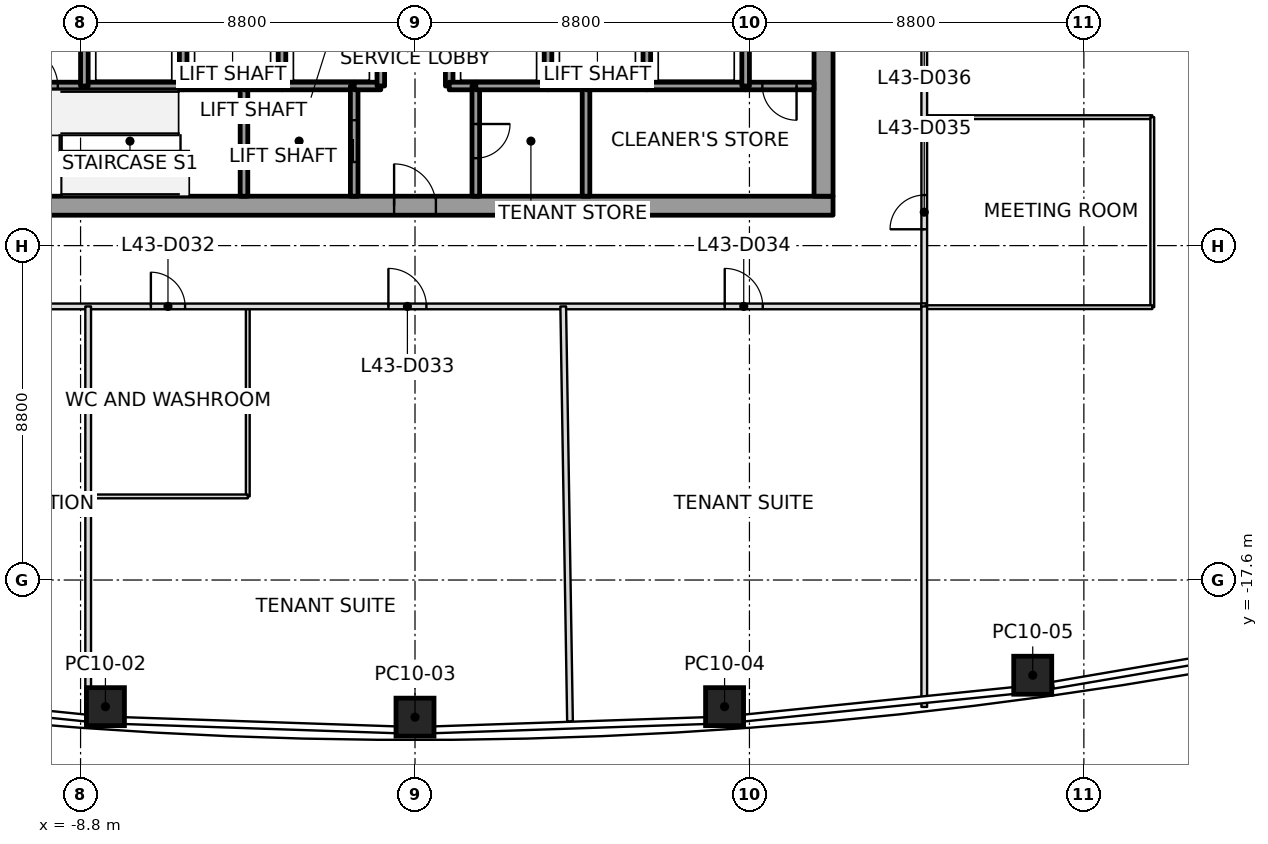
"""IFC4 building model, lengths in metres.
Left out: names, types, materials, properties, quantities, classifications, styles, units other than length and angle.
Written with IfcOpenShell. Run it as: python <this file> out.ifc"""

import sys

from ifc_helpers import new_model, si_unit, direction, frame, frame_2d, origin, origin_2d, place, context, subcontext, project, spatial, rectangle, extrude, element, fill, save


model = new_model("IFC4")
c1 = context("Model", 3, precision=1e-05, world=origin(), true_north=direction((0.0, 1.0)))
c2 = subcontext(c1, "Body", "Model", "MODEL_VIEW")
j1 = project(units=[si_unit("LENGTHUNIT", "METRE"), si_unit("PLANEANGLEUNIT", "RADIAN")], contexts=[c1])
p1 = place(None, origin())
s1 = spatial("IfcSite", under=j1, at=p1, CompositionType="ELEMENT")
p2 = place(p1, origin())
s2 = spatial("IfcBuilding", under=s1, at=p2, CompositionType="ELEMENT")
p3 = place(p2, frame((0.0, 0.0, 193.8)))
s3 = spatial("IfcBuildingStorey", under=s2, at=p3, CompositionType="ELEMENT", Elevation=193.8)
p4 = place(p3, frame((-8.146, -20.933, 0.0), z_axis=(0.008849193104, 0.011229320904, 0.999897791843), x_axis=(-0.997666886655, 0.067791509267, 0.008068118949)))
e1 = element("IfcColumn", 1, at=p4, inside=s3, PredefinedType="COLUMN", context=c2, shape_type="SweptSolid", body=[
    extrude(rectangle(XDim=1.0, YDim=1.0, at=origin_2d()), origin(), (0.0, 0.0, 1.0), 4.0),
])
p5 = place(p3, frame((0.0, -21.208, 0.0), z_axis=(0.0, 0.01141283087, 0.999934871525), x_axis=(1.0, 0.0, 0.0)))
e2 = element("IfcColumn", 2, at=p5, inside=s3, PredefinedType="COLUMN", context=c2, shape_type="SweptSolid", body=[
    extrude(rectangle(XDim=1.0, YDim=1.0, at=origin_2d()), origin(), (0.0, 0.0, 1.0), 4.0),
])
p6 = place(p3, frame((8.146, -20.933, 0.0), z_axis=(-0.008849193104, 0.011229320904, 0.999897791843), x_axis=(0.997666886655, 0.067791509267, 0.008068118949)))
e3 = element("IfcColumn", 3, at=p6, inside=s3, PredefinedType="COLUMN", context=c2, shape_type="SweptSolid", body=[
    extrude(rectangle(XDim=1.0, YDim=1.0, at=origin_2d()), origin(), (0.0, 0.0, 1.0), 4.0),
])
p7 = place(p3, frame((16.254, -20.106, 0.0), z_axis=(-0.017574453011, 0.010434831475, 0.999791104628), x_axis=(0.99068130509, 0.135257041378, 0.01600264049)))
e4 = element("IfcColumn", 4, at=p7, inside=s3, PredefinedType="COLUMN", context=c2, shape_type="SweptSolid", body=[
    extrude(rectangle(XDim=1.0, YDim=1.0, at=origin_2d()), origin(), (0.0, 0.0, 1.0), 4.001),
])
p8 = place(p3, frame((-11.0, -7.75, 0.0), z_axis=(0.0, 0.0, 1.0), x_axis=(1.0, 0.0, 0.0)))
e5 = element("IfcWall", 5, at=p8, inside=s3, PredefinedType="SHEAR", context=c2, shape_type="SweptSolid", body=[
    extrude(rectangle(XDim=22.0, YDim=0.5, at=frame_2d((11.0, 0.0))), origin(), (0.0, 0.0, 1.0), 4.0),
])
p9 = place(p8, frame((10.45, 0.0, 0.0)))
e6 = element("IfcOpeningElement", 6, at=p9, cuts=e5, PredefinedType="OPENING", context=c2, shape_type="SweptSolid", body=[
    extrude(rectangle(XDim=1.1, YDim=2.1, at=frame_2d((0.55, 1.05))), frame((0.0, 0.25, 0.0), z_axis=(0.0, -1.0, 0.0), x_axis=(1.0, 0.0, 0.0)), (0.0, 0.0, 1.0), 0.5),
])
p10 = place(p3, frame((10.75, -7.5, 0.0), z_axis=(0.0, 0.0, 1.0), x_axis=(0.0, 1.0, 0.0)))
e7 = element("IfcWall", 7, at=p10, inside=s3, PredefinedType="SHEAR", context=c2, shape_type="SweptSolid", body=[
    extrude(rectangle(XDim=15.0, YDim=0.5, at=frame_2d((7.5, 0.0))), origin(), (0.0, 0.0, 1.0), 4.0),
])
p11 = place(p10, frame((6.6, 0.0, 0.0)))
e8 = element("IfcOpeningElement", 8, at=p11, cuts=e7, PredefinedType="OPENING", context=c2, shape_type="SweptSolid", body=[
    extrude(rectangle(XDim=1.8, YDim=2.1, at=frame_2d((0.9, 1.05))), frame((0.0, 0.25, 0.0), z_axis=(0.0, -1.0, 0.0), x_axis=(1.0, 0.0, 0.0)), (0.0, 0.0, 1.0), 0.5),
])
p12 = place(p3, frame((-10.5, -4.6, 0.0), z_axis=(0.0, 0.0, 1.0), x_axis=(1.0, 0.0, 0.0)))
e9 = element("IfcWall", 9, at=p12, inside=s3, PredefinedType="SOLIDWALL", context=c2, shape_type="SweptSolid", body=[
    extrude(rectangle(XDim=1.8, YDim=0.2, at=frame_2d((0.9, 0.0))), origin(), (0.0, 0.0, 1.0), 3.85),
])
p13 = place(p12, frame((0.1, 0.0, 0.0)))
e10 = element("IfcOpeningElement", 10, at=p13, cuts=e9, PredefinedType="OPENING", context=c2, shape_type="SweptSolid", body=[
    extrude(rectangle(XDim=1.0, YDim=2.1, at=frame_2d((0.5, 1.05))), frame((0.0, 0.1, 0.0), z_axis=(0.0, -1.0, 0.0), x_axis=(1.0, 0.0, 0.0)), (0.0, 0.0, 1.0), 0.2),
])
p14 = place(p3, frame((-8.7, -4.6, 0.0), z_axis=(0.0, 0.0, 1.0), x_axis=(1.0, 0.0, 0.0)))
e11 = element("IfcWall", 11, at=p14, inside=s3, PredefinedType="SOLIDWALL", context=c2, shape_type="SweptSolid", body=[
    extrude(rectangle(XDim=2.6, YDim=0.2, at=frame_2d((1.3, 0.0))), origin(), (0.0, 0.0, 1.0), 3.85),
])
p15 = place(p3, frame((-8.7, -4.6, 0.0), z_axis=(0.0, 0.0, 1.0), x_axis=(0.0, 1.0, 0.0)))
e12 = element("IfcWall", 12, at=p15, inside=s3, PredefinedType="SOLIDWALL", context=c2, shape_type="SweptSolid", body=[
    extrude(rectangle(XDim=2.8, YDim=0.2, at=frame_2d((1.4, 0.0))), origin(), (0.0, 0.0, 1.0), 3.85),
])
p16 = place(p3, frame((-6.1, -4.6, 0.0), z_axis=(0.0, 0.0, 1.0), x_axis=(1.0, 0.0, 0.0)))
e13 = element("IfcWall", 13, at=p16, inside=s3, PredefinedType="SOLIDWALL", context=c2, shape_type="SweptSolid", body=[
    extrude(rectangle(XDim=1.6, YDim=0.2, at=frame_2d((0.8, 0.0))), origin(), (0.0, 0.0, 1.0), 3.85),
])
p17 = place(p3, frame((-6.1, -4.6, 0.0), z_axis=(0.0, 0.0, 1.0), x_axis=(0.0, 1.0, 0.0)))
e14 = element("IfcWall", 14, at=p17, inside=s3, PredefinedType="SOLIDWALL", context=c2, shape_type="SweptSolid", body=[
    extrude(rectangle(XDim=2.8, YDim=0.2, at=frame_2d((1.4, 0.0))), origin(), (0.0, 0.0, 1.0), 3.85),
])
p18 = place(p3, frame((-4.5, -4.6, 0.0), z_axis=(0.0, 0.0, 1.0), x_axis=(0.0, -1.0, 0.0)))
e15 = element("IfcWall", 15, at=p18, inside=s3, PredefinedType="SOLIDWALL", context=c2, shape_type="SweptSolid", body=[
    extrude(rectangle(XDim=2.9, YDim=0.2, at=frame_2d((1.45, 0.0))), origin(), (0.0, 0.0, 1.0), 3.85),
])
p19 = place(p3, frame((-4.5, -4.6, 0.0), z_axis=(0.0, 0.0, 1.0), x_axis=(1.0, 0.0, 0.0)))
e16 = element("IfcWall", 16, at=p19, inside=s3, PredefinedType="SOLIDWALL", context=c2, shape_type="SweptSolid", body=[
    extrude(rectangle(XDim=1.0, YDim=0.2, at=frame_2d((0.5, 0.0))), origin(), (0.0, 0.0, 1.0), 3.85),
])
p20 = place(p3, frame((-3.5, -4.6, 0.0), z_axis=(0.0, 0.0, 1.0), x_axis=(1.0, 0.0, 0.0)))
e17 = element("IfcWall", 17, at=p20, inside=s3, PredefinedType="SOLIDWALL", context=c2, shape_type="SweptSolid", body=[
    extrude(rectangle(XDim=1.9, YDim=0.2, at=frame_2d((0.95, 0.0))), origin(), (0.0, 0.0, 1.0), 3.85),
])
p21 = place(p3, frame((-3.5, -4.6, 0.0), z_axis=(0.0, 0.0, 1.0), x_axis=(0.0, 1.0, 0.0)))
e18 = element("IfcWall", 18, at=p21, inside=s3, PredefinedType="SOLIDWALL", context=c2, shape_type="SweptSolid", body=[
    extrude(rectangle(XDim=2.8, YDim=0.2, at=frame_2d((1.4, 0.0))), origin(), (0.0, 0.0, 1.0), 3.85),
])
p22 = place(p3, frame((-1.6, -7.5, 0.0), z_axis=(0.0, 0.0, 1.0), x_axis=(0.0, 1.0, 0.0)))
e19 = element("IfcWall", 19, at=p22, inside=s3, PredefinedType="SOLIDWALL", context=c2, shape_type="SweptSolid", body=[
    extrude(rectangle(XDim=2.9, YDim=0.2, at=frame_2d((1.45, 0.0))), origin(), (0.0, 0.0, 1.0), 3.85),
])
p23 = place(p22, frame((0.9, 0.0, 0.0)))
e20 = element("IfcOpeningElement", 20, at=p23, cuts=e19, PredefinedType="OPENING", context=c2, shape_type="SweptSolid", body=[
    extrude(rectangle(XDim=1.1, YDim=2.1, at=frame_2d((0.55, 1.05))), frame((0.0, 0.1, 0.0), z_axis=(0.0, -1.0, 0.0), x_axis=(1.0, 0.0, 0.0)), (0.0, 0.0, 1.0), 0.2),
])
p24 = place(p3, frame((-1.6, -4.6, 0.0), z_axis=(0.0, 0.0, 1.0), x_axis=(1.0, 0.0, 0.0)))
e21 = element("IfcWall", 21, at=p24, inside=s3, PredefinedType="SOLIDWALL", context=c2, shape_type="SweptSolid", body=[
    extrude(rectangle(XDim=0.7, YDim=0.2, at=frame_2d((0.35, 0.0))), origin(), (0.0, 0.0, 1.0), 3.85),
])
for number, where, z_axis, x_axis in (
    (22, (-0.9, -4.6, 0.0), (0.0, 0.0, 1.0), (0.0, 1.0, 0.0)),
    (23, (0.9, -1.8, 0.0), (0.0, 0.0, 1.0), (0.0, -1.0, 0.0)),
):
    element("IfcWall", number, at=place(p3, frame(where, z_axis=z_axis, x_axis=x_axis)), inside=s3, PredefinedType="SOLIDWALL", context=c2, shape_type="SweptSolid", body=[
        extrude(rectangle(XDim=2.8, YDim=0.2, at=frame_2d((1.4, 0.0))), origin(), (0.0, 0.0, 1.0), 3.85),
    ])
p25 = place(p3, frame((0.9, -4.6, 0.0), z_axis=(0.0, 0.0, 1.0), x_axis=(1.0, 0.0, 0.0)))
e24 = element("IfcWall", 24, at=p25, inside=s3, PredefinedType="SOLIDWALL", context=c2, shape_type="SweptSolid", body=[
    extrude(rectangle(XDim=0.7, YDim=0.2, at=frame_2d((0.35, 0.0))), origin(), (0.0, 0.0, 1.0), 3.85),
])
p26 = place(p3, frame((1.6, -4.6, 0.0), z_axis=(0.0, 0.0, 1.0), x_axis=(0.0, -1.0, 0.0)))
e25 = element("IfcWall", 25, at=p26, inside=s3, PredefinedType="SOLIDWALL", context=c2, shape_type="SweptSolid", body=[
    extrude(rectangle(XDim=2.9, YDim=0.2, at=frame_2d((1.45, 0.0))), origin(), (0.0, 0.0, 1.0), 3.85),
])
p27 = place(p26, frame((1.0, 0.0, 0.0)))
e26 = element("IfcOpeningElement", 26, at=p27, cuts=e25, PredefinedType="OPENING", context=c2, shape_type="SweptSolid", body=[
    extrude(rectangle(XDim=0.9, YDim=2.1, at=frame_2d((0.45, 1.05))), frame((0.0, 0.1, 0.0), z_axis=(0.0, -1.0, 0.0), x_axis=(1.0, 0.0, 0.0)), (0.0, 0.0, 1.0), 0.2),
])
p28 = place(p3, frame((3.5, -4.6, 0.0), z_axis=(0.0, 0.0, 1.0), x_axis=(-1.0, 0.0, 0.0)))
e27 = element("IfcWall", 27, at=p28, inside=s3, PredefinedType="SOLIDWALL", context=c2, shape_type="SweptSolid", body=[
    extrude(rectangle(XDim=1.9, YDim=0.2, at=frame_2d((0.95, 0.0))), origin(), (0.0, 0.0, 1.0), 3.85),
])
p29 = place(p3, frame((4.5, -4.6, 0.0), z_axis=(0.0, 0.0, 1.0), x_axis=(-1.0, 0.0, 0.0)))
e28 = element("IfcWall", 28, at=p29, inside=s3, PredefinedType="SOLIDWALL", context=c2, shape_type="SweptSolid", body=[
    extrude(rectangle(XDim=1.0, YDim=0.2, at=frame_2d((0.5, 0.0))), origin(), (0.0, 0.0, 1.0), 3.85),
])
p30 = place(p3, frame((3.5, -4.6, 0.0), z_axis=(0.0, 0.0, 1.0), x_axis=(0.0, 1.0, 0.0)))
e29 = element("IfcWall", 29, at=p30, inside=s3, PredefinedType="SOLIDWALL", context=c2, shape_type="SweptSolid", body=[
    extrude(rectangle(XDim=2.8, YDim=0.2, at=frame_2d((1.4, 0.0))), origin(), (0.0, 0.0, 1.0), 3.85),
])
p31 = place(p3, frame((4.5, -4.6, 0.0), z_axis=(0.0, 0.0, 1.0), x_axis=(0.0, -1.0, 0.0)))
e30 = element("IfcWall", 30, at=p31, inside=s3, PredefinedType="SOLIDWALL", context=c2, shape_type="SweptSolid", body=[
    extrude(rectangle(XDim=2.9, YDim=0.2, at=frame_2d((1.45, 0.0))), origin(), (0.0, 0.0, 1.0), 3.85),
])
p32 = place(p3, frame((6.1, -4.6, 0.0), z_axis=(0.0, 0.0, 1.0), x_axis=(-1.0, 0.0, 0.0)))
e31 = element("IfcWall", 31, at=p32, inside=s3, PredefinedType="SOLIDWALL", context=c2, shape_type="SweptSolid", body=[
    extrude(rectangle(XDim=1.6, YDim=0.2, at=frame_2d((0.8, 0.0))), origin(), (0.0, 0.0, 1.0), 3.85),
])
p33 = place(p3, frame((8.7, -4.6, 0.0), z_axis=(0.0, 0.0, 1.0), x_axis=(-1.0, 0.0, 0.0)))
e32 = element("IfcWall", 32, at=p33, inside=s3, PredefinedType="SOLIDWALL", context=c2, shape_type="SweptSolid", body=[
    extrude(rectangle(XDim=2.6, YDim=0.2, at=frame_2d((1.3, 0.0))), origin(), (0.0, 0.0, 1.0), 3.85),
])
p34 = place(p3, frame((6.1, -4.6, 0.0), z_axis=(0.0, 0.0, 1.0), x_axis=(0.0, 1.0, 0.0)))
e33 = element("IfcWall", 33, at=p34, inside=s3, PredefinedType="SOLIDWALL", context=c2, shape_type="SweptSolid", body=[
    extrude(rectangle(XDim=2.8, YDim=0.2, at=frame_2d((1.4, 0.0))), origin(), (0.0, 0.0, 1.0), 3.85),
])
p35 = place(p3, frame((10.5, -4.6, 0.0), z_axis=(0.0, 0.0, 1.0), x_axis=(-1.0, 0.0, 0.0)))
e34 = element("IfcWall", 34, at=p35, inside=s3, PredefinedType="SOLIDWALL", context=c2, shape_type="SweptSolid", body=[
    extrude(rectangle(XDim=1.8, YDim=0.2, at=frame_2d((0.9, 0.0))), origin(), (0.0, 0.0, 1.0), 3.85),
])
p36 = place(p35, frame((0.46, 0.0, 0.0)))
e35 = element("IfcOpeningElement", 35, at=p36, cuts=e34, PredefinedType="OPENING", context=c2, shape_type="SweptSolid", body=[
    extrude(rectangle(XDim=0.9, YDim=2.1, at=frame_2d((0.45, 1.05))), frame((0.0, 0.1, 0.0), z_axis=(0.0, -1.0, 0.0), x_axis=(1.0, 0.0, 0.0)), (0.0, 0.0, 1.0), 0.2),
])
p37 = place(p3, frame((8.7, -1.8, 0.0), z_axis=(0.0, 0.0, 1.0), x_axis=(0.0, -1.0, 0.0)))
e36 = element("IfcWall", 36, at=p37, inside=s3, PredefinedType="SOLIDWALL", context=c2, shape_type="SweptSolid", body=[
    extrude(rectangle(XDim=2.8, YDim=0.2, at=frame_2d((1.4, 0.0))), origin(), (0.0, 0.0, 1.0), 3.85),
])
p38 = place(p3, frame((-8.6, -10.4, 0.0), z_axis=(0.0, 0.0, 1.0), x_axis=(0.0, -1.0, 0.0)))
e37 = element("IfcWall", 37, at=p38, inside=s3, PredefinedType="PARTITIONING", context=c2, shape_type="SweptSolid", body=[
    extrude(rectangle(XDim=10.98, YDim=0.15, at=frame_2d((5.49, 0.0))), origin(), (0.0, 0.0, 1.0), 3.234),
])
p39 = place(p3, frame((3.9, -10.4, 0.0), z_axis=(0.0, 0.0, 1.0), x_axis=(0.016362664918, -0.999866122637, 0.0)))
e38 = element("IfcWall", 38, at=p39, inside=s3, PredefinedType="PARTITIONING", context=c2, shape_type="SweptSolid", body=[
    extrude(rectangle(XDim=10.922, YDim=0.15, at=frame_2d((5.461, 0.0))), origin(), (0.0, 0.0, 1.0), 3.234),
])
p40 = place(p3, frame((13.4, -10.4, 0.0), z_axis=(0.0, 0.0, 1.0), x_axis=(0.0, -1.0, 0.0)))
e39 = element("IfcWall", 39, at=p40, inside=s3, PredefinedType="PARTITIONING", context=c2, shape_type="SweptSolid", body=[
    extrude(rectangle(XDim=10.54, YDim=0.15, at=frame_2d((5.27, 0.0))), origin(), (0.0, 0.0, 1.0), 3.234),
])
p41 = place(p3, frame((-13.32, -10.4, 0.0), z_axis=(0.0, 0.0, 1.0), x_axis=(1.0, 0.0, 0.0)))
e40 = element("IfcWall", 40, at=p41, inside=s3, PredefinedType="PARTITIONING", context=c2, shape_type="SweptSolid", body=[
    extrude(rectangle(XDim=26.64, YDim=0.15, at=frame_2d((13.32, 0.0))), origin(), (0.0, 0.0, 1.0), 3.317),
])
p42 = place(p41, frame((1.82, 0.0, 0.0)))
e41 = element("IfcOpeningElement", 41, at=p42, cuts=e40, PredefinedType="OPENING", context=c2, shape_type="SweptSolid", body=[
    extrude(rectangle(XDim=1.0, YDim=2.1, at=frame_2d((0.5, 1.05))), frame((0.0, 0.075, 0.0), z_axis=(0.0, -1.0, 0.0), x_axis=(1.0, 0.0, 0.0)), (0.0, 0.0, 1.0), 0.15),
])
p43 = place(p41, frame((6.37, 0.0, 0.0)))
e42 = element("IfcOpeningElement", 42, at=p43, cuts=e40, PredefinedType="OPENING", context=c2, shape_type="SweptSolid", body=[
    extrude(rectangle(XDim=0.9, YDim=2.1, at=frame_2d((0.45, 1.05))), frame((0.0, 0.075, 0.0), z_axis=(0.0, -1.0, 0.0), x_axis=(1.0, 0.0, 0.0)), (0.0, 0.0, 1.0), 0.15),
])
p44 = place(p41, frame((12.62, 0.0, 0.0)))
e43 = element("IfcOpeningElement", 43, at=p44, cuts=e40, PredefinedType="OPENING", context=c2, shape_type="SweptSolid", body=[
    extrude(rectangle(XDim=1.0, YDim=2.1, at=frame_2d((0.5, 1.05))), frame((0.0, 0.075, 0.0), z_axis=(0.0, -1.0, 0.0), x_axis=(1.0, 0.0, 0.0)), (0.0, 0.0, 1.0), 0.15),
])
p45 = place(p41, frame((21.47, 0.0, 0.0)))
e44 = element("IfcOpeningElement", 44, at=p45, cuts=e40, PredefinedType="OPENING", context=c2, shape_type="SweptSolid", body=[
    extrude(rectangle(XDim=1.0, YDim=2.1, at=frame_2d((0.5, 1.05))), frame((0.0, 0.075, 0.0), z_axis=(0.0, -1.0, 0.0), x_axis=(1.0, 0.0, 0.0)), (0.0, 0.0, 1.0), 0.15),
])
p46 = place(p3, frame((13.4, -10.32, 0.0), z_axis=(0.0, 0.0, 1.0), x_axis=(0.0, 1.0, 0.0)))
e45 = element("IfcWall", 45, at=p46, inside=s3, PredefinedType="PARTITIONING", context=c2, shape_type="SweptSolid", body=[
    extrude(rectangle(XDim=20.64, YDim=0.15, at=frame_2d((10.32, 0.0))), origin(), (0.0, 0.0, 1.0), 3.166),
])
p47 = place(p46, frame((15.47, 0.0, 0.0)))
e46 = element("IfcOpeningElement", 46, at=p47, cuts=e45, PredefinedType="OPENING", context=c2, shape_type="SweptSolid", body=[
    extrude(rectangle(XDim=1.0, YDim=2.1, at=frame_2d((0.5, 1.05))), frame((0.0, 0.075, 0.0), z_axis=(0.0, -1.0, 0.0), x_axis=(1.0, 0.0, 0.0)), (0.0, 0.0, 1.0), 0.15),
])
p48 = place(p46, frame((1.95, 0.0, 0.0)))
e47 = element("IfcOpeningElement", 47, at=p48, cuts=e45, PredefinedType="OPENING", context=c2, shape_type="SweptSolid", body=[
    extrude(rectangle(XDim=0.9, YDim=2.1, at=frame_2d((0.45, 1.05))), frame((0.0, 0.075, 0.0), z_axis=(0.0, -1.0, 0.0), x_axis=(1.0, 0.0, 0.0)), (0.0, 0.0, 1.0), 0.15),
])
p49 = place(p46, frame((7.61, 0.0, 0.0)))
e48 = element("IfcOpeningElement", 48, at=p49, cuts=e45, PredefinedType="OPENING", context=c2, shape_type="SweptSolid", body=[
    extrude(rectangle(XDim=1.0, YDim=2.1, at=frame_2d((0.5, 1.05))), frame((0.0, 0.075, 0.0), z_axis=(0.0, -1.0, 0.0), x_axis=(1.0, 0.0, 0.0)), (0.0, 0.0, 1.0), 0.15),
])
p50 = place(p3, frame((-4.4, -10.43, 0.0), z_axis=(0.0, 0.0, 1.0), x_axis=(0.0, -1.0, 0.0)))
e49 = element("IfcWall", 49, at=p50, inside=s3, PredefinedType="PARTITIONING", context=c2, shape_type="SweptSolid", body=[
    extrude(rectangle(XDim=4.97, YDim=0.1, at=frame_2d((2.485, 0.0))), origin(), (0.0, 0.0, 1.0), 3.45),
])
p51 = place(p3, frame((-4.4, -15.4, 0.0), z_axis=(0.0, 0.0, 1.0), x_axis=(-1.0, 0.0, 0.0)))
e50 = element("IfcWall", 50, at=p51, inside=s3, PredefinedType="PARTITIONING", context=c2, shape_type="SweptSolid", body=[
    extrude(rectangle(XDim=4.17, YDim=0.1, at=frame_2d((2.085, 0.0))), origin(), (0.0, 0.0, 1.0), 3.317),
])
p52 = place(p3, frame((13.43, -5.42, 0.0), z_axis=(0.0, 0.0, 1.0), x_axis=(1.0, 0.0, 0.0)))
e51 = element("IfcWall", 51, at=p52, inside=s3, PredefinedType="PARTITIONING", context=c2, shape_type="SweptSolid", body=[
    extrude(rectangle(XDim=5.97, YDim=0.1, at=frame_2d((2.985, 0.0))), origin(), (0.0, 0.0, 1.0), 3.247),
])
p53 = place(p3, frame((19.4, -5.42, 0.0), z_axis=(0.0, 0.0, 1.0), x_axis=(0.0, -1.0, 0.0)))
e52 = element("IfcWall", 52, at=p53, inside=s3, PredefinedType="PARTITIONING", context=c2, shape_type="SweptSolid", body=[
    extrude(rectangle(XDim=5.0, YDim=0.1, at=frame_2d((2.5, 0.0))), origin(), (0.0, 0.0, 1.0), 3.317),
])
p54 = place(p3, frame((19.4, -10.42, 0.0), z_axis=(0.0, 0.0, 1.0), x_axis=(-1.0, 0.0, 0.0)))
e53 = element("IfcWall", 53, at=p54, inside=s3, PredefinedType="PARTITIONING", context=c2, shape_type="SweptSolid", body=[
    extrude(rectangle(XDim=5.97, YDim=0.1, at=frame_2d((2.985, 0.0))), origin(), (0.0, 0.0, 1.0), 3.166),
])
p55 = place(p43, origin())
e54 = element("IfcDoor", 54, at=p55, inside=s3, OperationType="SINGLE_SWING_RIGHT", PredefinedType="DOOR", context=c2, shape_type="SweptSolid", body=[
    extrude(rectangle(XDim=0.9, YDim=2.1, at=frame_2d((0.45, 1.05))), frame((0.0, 0.025, 0.0), z_axis=(0.0, -1.0, 0.0), x_axis=(1.0, 0.0, 0.0)), (0.0, 0.0, 1.0), 0.05),
])
fill(e42, e54)
p56 = place(p44, origin())
e55 = element("IfcDoor", 55, at=p56, inside=s3, OperationType="SINGLE_SWING_RIGHT", PredefinedType="DOOR", context=c2, shape_type="SweptSolid", body=[
    extrude(rectangle(XDim=1.0, YDim=2.1, at=frame_2d((0.5, 1.05))), frame((0.0, 0.025, 0.0), z_axis=(0.0, -1.0, 0.0), x_axis=(1.0, 0.0, 0.0)), (0.0, 0.0, 1.0), 0.05),
])
fill(e43, e55)
p57 = place(p45, origin())
e56 = element("IfcDoor", 56, at=p57, inside=s3, OperationType="SINGLE_SWING_RIGHT", PredefinedType="DOOR", context=c2, shape_type="SweptSolid", body=[
    extrude(rectangle(XDim=1.0, YDim=2.1, at=frame_2d((0.5, 1.05))), frame((0.0, 0.025, 0.0), z_axis=(0.0, -1.0, 0.0), x_axis=(1.0, 0.0, 0.0)), (0.0, 0.0, 1.0), 0.05),
])
fill(e44, e56)
p58 = place(p48, origin())
e57 = element("IfcDoor", 57, at=p58, inside=s3, OperationType="SINGLE_SWING_RIGHT", PredefinedType="DOOR", context=c2, shape_type="SweptSolid", body=[
    extrude(rectangle(XDim=0.9, YDim=2.1, at=frame_2d((0.45, 1.05))), frame((0.0, 0.025, 0.0), z_axis=(0.0, -1.0, 0.0), x_axis=(1.0, 0.0, 0.0)), (0.0, 0.0, 1.0), 0.05),
])
fill(e47, e57)
p59 = place(p23, origin())
e58 = element("IfcDoor", 58, at=p59, inside=s3, OperationType="SLIDING_TO_RIGHT", PredefinedType="DOOR", context=c2, shape_type="SweptSolid", body=[
    extrude(rectangle(XDim=1.1, YDim=2.1, at=frame_2d((0.55, 1.05))), frame((0.0, 0.025, 0.0), z_axis=(0.0, -1.0, 0.0), x_axis=(1.0, 0.0, 0.0)), (0.0, 0.0, 1.0), 0.05),
])
fill(e20, e58)
p60 = place(p13, origin())
e59 = element("IfcDoor", 59, at=p60, inside=s3, OperationType="SINGLE_SWING_LEFT", PredefinedType="DOOR", context=c2, shape_type="SweptSolid", body=[
    extrude(rectangle(XDim=1.0, YDim=2.1, at=frame_2d((0.5, 1.05))), frame((0.0, 0.025, 0.0), z_axis=(0.0, -1.0, 0.0), x_axis=(1.0, 0.0, 0.0)), (0.0, 0.0, 1.0), 0.05),
])
fill(e10, e59)
p61 = place(p36, origin())
e60 = element("IfcDoor", 60, at=p61, inside=s3, OperationType="SINGLE_SWING_LEFT", PredefinedType="DOOR", context=c2, shape_type="SweptSolid", body=[
    extrude(rectangle(XDim=0.9, YDim=2.1, at=frame_2d((0.45, 1.05))), frame((0.0, 0.025, 0.0), z_axis=(0.0, -1.0, 0.0), x_axis=(1.0, 0.0, 0.0)), (0.0, 0.0, 1.0), 0.05),
])
fill(e35, e60)
p62 = place(p27, origin())
e61 = element("IfcDoor", 61, at=p62, inside=s3, OperationType="SINGLE_SWING_LEFT", PredefinedType="DOOR", context=c2, shape_type="SweptSolid", body=[
    extrude(rectangle(XDim=0.9, YDim=2.1, at=frame_2d((0.45, 1.05))), frame((0.0, 0.025, 0.0), z_axis=(0.0, -1.0, 0.0), x_axis=(1.0, 0.0, 0.0)), (0.0, 0.0, 1.0), 0.05),
])
fill(e26, e61)
p63 = place(p9, origin())
e62 = element("IfcDoor", 62, at=p63, inside=s3, OperationType="SINGLE_SWING_LEFT", PredefinedType="DOOR", context=c2, shape_type="SweptSolid", body=[
    extrude(rectangle(XDim=1.1, YDim=2.1, at=frame_2d((0.55, 1.05))), frame((0.0, 0.025, 0.0), z_axis=(0.0, -1.0, 0.0), x_axis=(1.0, 0.0, 0.0)), (0.0, 0.0, 1.0), 0.05),
])
fill(e6, e62)
save(model, sys.argv[1])
